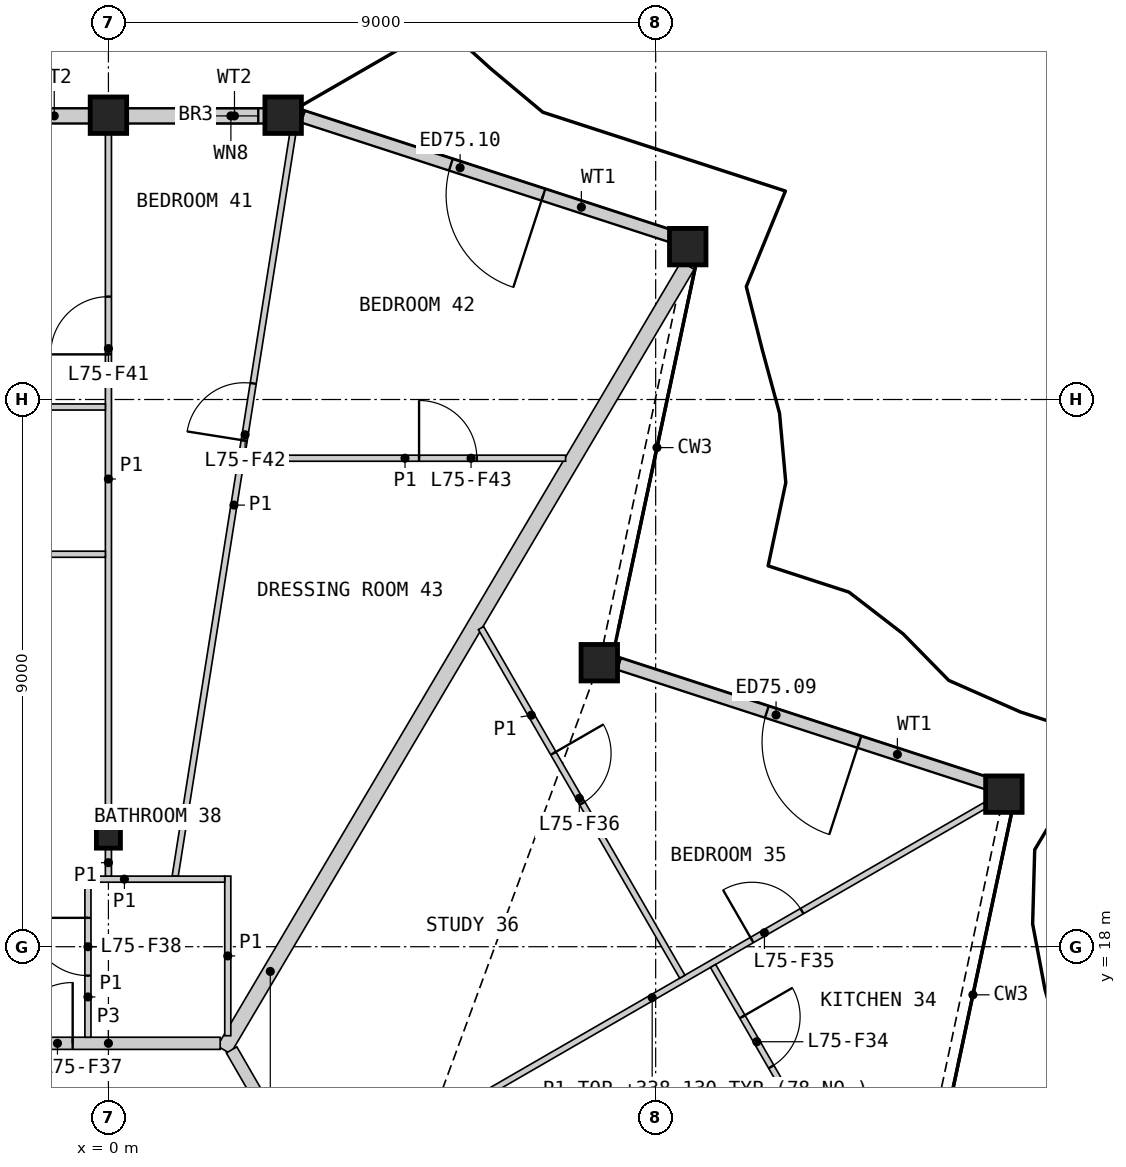
"""IFC4 building model, lengths in metres.
Left out: names, types, materials, properties, quantities, classifications, styles, units other than length and angle.
Written with IfcOpenShell. Run it as: python <this file> out.ifc"""

import sys

from ifc_helpers import new_model, si_unit, direction, frame, frame_2d, origin, origin_2d, place, context, subcontext, project, spatial, rectangle, hollow_rectangle, i_section, extrude, element, fill, save


model = new_model("IFC4")
c1 = context("Model", 3, precision=1e-05, world=origin(), true_north=direction((0.0, 1.0)))
c2 = subcontext(c1, "Body", "Model", "MODEL_VIEW")
j1 = project(units=[si_unit("LENGTHUNIT", "METRE"), si_unit("PLANEANGLEUNIT", "RADIAN")], contexts=[c1])
p1 = place(None, origin())
s1 = spatial("IfcSite", under=j1, at=p1, CompositionType="ELEMENT")
p2 = place(p1, origin())
s2 = spatial("IfcBuilding", under=s1, at=p2, CompositionType="ELEMENT")
p3 = place(p2, frame((0.0, 0.0, 335.8)))
s3 = spatial("IfcBuildingStorey", under=s2, at=p3, CompositionType="ELEMENT", Elevation=335.8)
for number, where, z_axis, x_axis in (
    (1, (14.727, 20.509, 0.0), (0.0, 0.0, 1.0), (1.0, 0.0, 0.0)),
    (2, (8.073, 22.671, 0.0), (0.0, 0.0, 1.0), (1.0, 0.0, 0.0)),
    (3, (9.527, 29.514, 0.0), (0.0, 0.0, 1.0), (1.0, 0.0, 0.0)),
    (4, (2.874, 31.676, 0.0), (0.0, 0.0, 1.0), (1.0, 0.0, 0.0)),
    (5, (0.0, 31.676, 0.0), (0.0, 0.0, 1.0), (1.0, 0.0, 0.0)),
):
    element("IfcColumn", number, at=place(p3, frame(where, z_axis=z_axis, x_axis=x_axis)), inside=s3, PredefinedType="COLUMN", context=c2, shape_type="SweptSolid", body=[
        extrude(hollow_rectangle(XDim=0.6, YDim=0.6, WallThickness=0.04, at=origin_2d()), origin(), (0.0, 0.0, 1.0), 3.4),
    ])
p4 = place(p3, frame((0.0, 19.811, 0.0), z_axis=(0.0, 0.0, 1.0), x_axis=(1.0, 0.0, 0.0)))
e6 = element("IfcColumn", 6, at=p4, inside=s3, PredefinedType="COLUMN", context=c2, shape_type="SweptSolid", body=[
    extrude(i_section(OverallWidth=0.396, OverallDepth=0.381, WebThickness=0.019, FlangeThickness=0.03, at=origin_2d()), origin(), (0.0, 0.0, 1.0), 3.4),
])
p5 = place(p3, frame((14.501, 20.667, 0.0), z_axis=(0.0, 0.0, 1.0), x_axis=(-0.951049165164, 0.309039617915, 0.0)))
e7 = element("IfcWall", 7, at=p5, inside=s3, PredefinedType="SOLIDWALL", context=c2, shape_type="SweptSolid", body=[
    extrude(rectangle(XDim=6.417, YDim=0.2, at=frame_2d((3.208, 0.0))), origin(), (0.0, 0.0, 1.0), 2.488),
])
p6 = place(p5, frame((2.262, 0.0, 0.0)))
e8 = element("IfcOpeningElement", 8, at=p6, cuts=e7, PredefinedType="OPENING", context=c2, shape_type="SweptSolid", body=[
    extrude(rectangle(XDim=1.6, YDim=2.25, at=frame_2d((0.8, 1.125))), frame((0.0, 0.11, 0.0), z_axis=(0.0, -1.0, 0.0), x_axis=(1.0, 0.0, 0.0)), (0.0, 0.0, 1.0), 0.22),
])
p7 = place(p3, frame((9.304, 29.668, 0.0), z_axis=(0.0, 0.0, 1.0), x_axis=(-0.951059216388, 0.309008684221, 0.0)))
e9 = element("IfcWall", 9, at=p7, inside=s3, PredefinedType="SOLIDWALL", context=c2, shape_type="SweptSolid", body=[
    extrude(rectangle(XDim=6.42, YDim=0.2, at=frame_2d((3.21, 0.0))), origin(), (0.0, 0.0, 1.0), 2.488),
])
p8 = place(p7, frame((2.262, 0.0, 0.0)))
e10 = element("IfcOpeningElement", 10, at=p8, cuts=e9, PredefinedType="OPENING", context=c2, shape_type="SweptSolid", body=[
    extrude(rectangle(XDim=1.6, YDim=2.25, at=frame_2d((0.8, 1.125))), frame((0.0, 0.11, 0.0), z_axis=(0.0, -1.0, 0.0), x_axis=(1.0, 0.0, 0.0)), (0.0, 0.0, 1.0), 0.22),
])
p9 = place(p3, frame((2.664, 31.664, 0.0), z_axis=(0.0, 0.0, 1.0), x_axis=(-1.0, 0.0, 0.0)))
e11 = element("IfcWall", 11, at=p9, inside=s3, PredefinedType="SOLIDWALL", context=c2, shape_type="SweptSolid", body=[
    extrude(rectangle(XDim=2.364, YDim=0.25, at=frame_2d((1.182, 0.0))), origin(), (0.0, 0.0, 1.0), 2.488),
])
p10 = place(p9, frame((0.2, 0.0, 1.5)))
e12 = element("IfcOpeningElement", 12, at=p10, cuts=e11, PredefinedType="OPENING", context=c2, shape_type="SweptSolid", body=[
    extrude(rectangle(XDim=0.9, YDim=0.7, at=frame_2d((0.45, 0.35))), frame((0.0, 0.135, 0.0), z_axis=(0.0, -1.0, 0.0), x_axis=(1.0, 0.0, 0.0)), (0.0, 0.0, 1.0), 0.27),
])
p11 = place(p3, frame((-0.3, 31.664, 0.0), z_axis=(0.0, 0.0, 1.0), x_axis=(-1.0, 0.0, 0.0)))
e13 = element("IfcWall", 13, at=p11, inside=s3, PredefinedType="SOLIDWALL", context=c2, shape_type="SweptSolid", body=[
    extrude(rectangle(XDim=2.364, YDim=0.25, at=frame_2d((1.182, 0.0))), origin(), (0.0, 0.0, 1.0), 2.488),
])
p12 = place(p3, frame((1.899, 16.303, 0.0), z_axis=(0.0, 0.0, 1.0), x_axis=(0.508895604687, 0.860828242758, 0.0)))
e14 = element("IfcWall", 14, at=p12, inside=s3, PredefinedType="PARTITIONING", context=c2, shape_type="SweptSolid", body=[
    extrude(rectangle(XDim=14.986, YDim=0.25, at=frame_2d((7.493, 0.0))), origin(), (0.0, 0.0, 1.0), 2.33),
])
p13 = place(p3, frame((2.025, 16.303, 0.0), z_axis=(0.0, 0.0, 1.0), x_axis=(0.499978750566, -0.866037671803, 0.0)))
e15 = element("IfcWall", 15, at=p13, inside=s3, PredefinedType="PARTITIONING", context=c2, shape_type="SweptSolid", body=[
    extrude(rectangle(XDim=4.288, YDim=0.2, at=frame_2d((2.144, 0.0))), origin(), (0.0, 0.0, 1.0), 3.1),
])
p14 = place(p3, frame((-1.838, 16.411, 0.0), z_axis=(0.0, 0.0, 1.0), x_axis=(1.0, 0.0, 0.0)))
e16 = element("IfcWall", 16, at=p14, inside=s3, PredefinedType="PARTITIONING", context=c2, shape_type="SweptSolid", body=[
    extrude(rectangle(XDim=3.676, YDim=0.2, at=frame_2d((1.838, 0.0))), origin(), (0.0, 0.0, 1.0), 3.1),
])
p15 = place(p14, frame((0.25, 0.0, 0.0)))
e17 = element("IfcOpeningElement", 17, at=p15, cuts=e16, PredefinedType="OPENING", context=c2, shape_type="SweptSolid", body=[
    extrude(rectangle(XDim=1.0, YDim=2.1, at=frame_2d((0.5, 1.05))), frame((0.0, 0.11, 0.0), z_axis=(0.0, -1.0, 0.0), x_axis=(1.0, 0.0, 0.0)), (0.0, 0.0, 1.0), 0.22),
])
p16 = place(p3, frame((3.469, 14.003, 0.0), z_axis=(0.0, 0.0, 1.0), x_axis=(0.866021563384, 0.50000665171, 0.0)))
e18 = element("IfcWall", 18, at=p16, inside=s3, PredefinedType="PARTITIONING", context=c2, shape_type="SweptSolid", body=[
    extrude(rectangle(XDim=12.641, YDim=0.1, at=frame_2d((6.321, 0.0))), origin(), (0.0, 0.0, 1.0), 2.33),
])
p17 = place(p16, frame((8.215, 0.0, 0.0)))
e19 = element("IfcOpeningElement", 19, at=p17, cuts=e18, PredefinedType="OPENING", context=c2, shape_type="SweptSolid", body=[
    extrude(rectangle(XDim=0.95, YDim=2.1, at=frame_2d((0.475, 1.05))), frame((0.0, 0.06, 0.0), z_axis=(0.0, -1.0, 0.0), x_axis=(1.0, 0.0, 0.0)), (0.0, 0.0, 1.0), 0.12),
])
p18 = place(p3, frame((1.098, 19.16, 0.0), z_axis=(0.0, 0.0, 1.0), x_axis=(0.156426176129, 0.987689653394, 0.0)))
e20 = element("IfcWall", 20, at=p18, inside=s3, PredefinedType="PARTITIONING", context=c2, shape_type="SweptSolid", body=[
    extrude(rectangle(XDim=12.358, YDim=0.1, at=frame_2d((6.179, 0.0))), origin(), (0.0, 0.0, 1.0), 2.33),
])
p19 = place(p18, frame((7.255, 0.0, 0.0)))
e21 = element("IfcOpeningElement", 21, at=p19, cuts=e20, PredefinedType="OPENING", context=c2, shape_type="SweptSolid", body=[
    extrude(rectangle(XDim=0.95, YDim=2.1, at=frame_2d((0.475, 1.05))), frame((0.0, 0.06, 0.0), z_axis=(0.0, -1.0, 0.0), x_axis=(1.0, 0.0, 0.0)), (0.0, 0.0, 1.0), 0.12),
])
p20 = place(p3, frame((0.0, 20.019, 0.0), z_axis=(0.0, 0.0, 1.0), x_axis=(0.0, 1.0, 0.0)))
e22 = element("IfcWall", 22, at=p20, inside=s3, PredefinedType="PARTITIONING", context=c2, shape_type="SweptSolid", body=[
    extrude(rectangle(XDim=11.347, YDim=0.1, at=frame_2d((5.674, 0.0))), origin(), (0.0, 0.0, 1.0), 2.33),
])
p21 = place(p20, frame((7.723, 0.0, 0.0)))
e23 = element("IfcOpeningElement", 23, at=p21, cuts=e22, PredefinedType="OPENING", context=c2, shape_type="SweptSolid", body=[
    extrude(rectangle(XDim=0.95, YDim=2.1, at=frame_2d((0.475, 1.05))), frame((0.0, 0.06, 0.0), z_axis=(0.0, -1.0, 0.0), x_axis=(1.0, 0.0, 0.0)), (0.0, 0.0, 1.0), 0.12),
])
p22 = place(p3, frame((-8.005, 26.877, 0.0), z_axis=(0.0, 0.0, 1.0), x_axis=(1.0, 0.0, 0.0)))
e24 = element("IfcWall", 24, at=p22, inside=s3, PredefinedType="PARTITIONING", context=c2, shape_type="SweptSolid", body=[
    extrude(rectangle(XDim=7.955, YDim=0.1, at=frame_2d((3.978, 0.0))), origin(), (0.0, 0.0, 1.0), 2.33),
])
p23 = place(p22, frame((3.853, 0.0, 0.0)))
e25 = element("IfcOpeningElement", 25, at=p23, cuts=e24, PredefinedType="OPENING", context=c2, shape_type="SweptSolid", body=[
    extrude(rectangle(XDim=0.95, YDim=2.1, at=frame_2d((0.475, 1.05))), frame((0.0, 0.06, 0.0), z_axis=(0.0, -1.0, 0.0), x_axis=(1.0, 0.0, 0.0)), (0.0, 0.0, 1.0), 0.12),
])
p24 = place(p3, frame((6.127, 23.241, 0.0), z_axis=(0.0, 0.0, 1.0), x_axis=(0.500021410345, -0.866013042163, 0.0)))
e26 = element("IfcWall", 26, at=p24, inside=s3, PredefinedType="PARTITIONING", context=c2, shape_type="SweptSolid", body=[
    extrude(rectangle(XDim=6.621, YDim=0.1, at=frame_2d((3.311, 0.0))), origin(), (0.0, 0.0, 1.0), 2.33),
])
p25 = place(p24, frame((2.379, 0.0, 0.0)))
e27 = element("IfcOpeningElement", 27, at=p25, cuts=e26, PredefinedType="OPENING", context=c2, shape_type="SweptSolid", body=[
    extrude(rectangle(XDim=0.95, YDim=2.1, at=frame_2d((0.475, 1.05))), frame((0.0, 0.06, 0.0), z_axis=(0.0, -1.0, 0.0), x_axis=(1.0, 0.0, 0.0)), (0.0, 0.0, 1.0), 0.12),
])
p26 = place(p3, frame((-6.607, 24.455, 0.0), z_axis=(0.0, 0.0, 1.0), x_axis=(1.0, 0.0, 0.0)))
e28 = element("IfcWall", 28, at=p26, inside=s3, PredefinedType="PARTITIONING", context=c2, shape_type="SweptSolid", body=[
    extrude(rectangle(XDim=6.557, YDim=0.1, at=frame_2d((3.279, 0.0))), origin(), (0.0, 0.0, 1.0), 2.33),
])
p27 = place(p26, frame((3.555, 0.0, 0.0)))
e29 = element("IfcOpeningElement", 29, at=p27, cuts=e28, PredefinedType="OPENING", context=c2, shape_type="SweptSolid", body=[
    extrude(rectangle(XDim=0.95, YDim=2.1, at=frame_2d((0.475, 1.05))), frame((0.0, 0.06, 0.0), z_axis=(0.0, -1.0, 0.0), x_axis=(1.0, 0.0, 0.0)), (0.0, 0.0, 1.0), 0.12),
])
p28 = place(p3, frame((2.237, 26.034, 0.0), z_axis=(0.0, 0.0, 1.0), x_axis=(1.0, 0.0, 0.0)))
e30 = element("IfcWall", 30, at=p28, inside=s3, PredefinedType="PARTITIONING", context=c2, shape_type="SweptSolid", body=[
    extrude(rectangle(XDim=5.282, YDim=0.1, at=frame_2d((2.641, 0.0))), origin(), (0.0, 0.0, 1.0), 2.33),
])
p29 = place(p28, frame((2.872, 0.0, 0.0)))
e31 = element("IfcOpeningElement", 31, at=p29, cuts=e30, PredefinedType="OPENING", context=c2, shape_type="SweptSolid", body=[
    extrude(rectangle(XDim=0.95, YDim=2.1, at=frame_2d((0.475, 1.05))), frame((0.0, 0.06, 0.0), z_axis=(0.0, -1.0, 0.0), x_axis=(1.0, 0.0, 0.0)), (0.0, 0.0, 1.0), 0.12),
])
p30 = place(p3, frame((9.944, 17.684, 0.0), z_axis=(0.0, 0.0, 1.0), x_axis=(0.499972176429, -0.866041467135, 0.0)))
e32 = element("IfcWall", 32, at=p30, inside=s3, PredefinedType="PARTITIONING", context=c2, shape_type="SweptSolid", body=[
    extrude(rectangle(XDim=5.021, YDim=0.1, at=frame_2d((2.511, 0.0))), origin(), (0.0, 0.0, 1.0), 2.33),
])
p31 = place(p30, frame((0.964, 0.0, 0.0)))
e33 = element("IfcOpeningElement", 33, at=p31, cuts=e32, PredefinedType="OPENING", context=c2, shape_type="SweptSolid", body=[
    extrude(rectangle(XDim=0.95, YDim=2.1, at=frame_2d((0.475, 1.05))), frame((0.0, 0.06, 0.0), z_axis=(0.0, -1.0, 0.0), x_axis=(1.0, 0.0, 0.0)), (0.0, 0.0, 1.0), 0.12),
])
p32 = place(p3, frame((-0.337, 16.511, 0.0), z_axis=(0.0, 0.0, 1.0), x_axis=(0.0, 1.0, 0.0)))
e34 = element("IfcWall", 34, at=p32, inside=s3, PredefinedType="PARTITIONING", context=c2, shape_type="SweptSolid", body=[
    extrude(rectangle(XDim=2.65, YDim=0.1, at=frame_2d((1.325, 0.0))), origin(), (0.0, 0.0, 1.0), 2.33),
])
p33 = place(p32, frame((1.014, 0.0, 0.0)))
e35 = element("IfcOpeningElement", 35, at=p33, cuts=e34, PredefinedType="OPENING", context=c2, shape_type="SweptSolid", body=[
    extrude(rectangle(XDim=0.95, YDim=2.1, at=frame_2d((0.475, 1.05))), frame((0.0, 0.06, 0.0), z_axis=(0.0, -1.0, 0.0), x_axis=(1.0, 0.0, 0.0)), (0.0, 0.0, 1.0), 0.12),
])
p34 = place(p3, frame((1.963, 16.536, 0.0), z_axis=(0.0, 0.0, 1.0), x_axis=(0.0, 1.0, 0.0)))
e36 = element("IfcWall", 36, at=p34, inside=s3, PredefinedType="PARTITIONING", context=c2, shape_type="SweptSolid", body=[
    extrude(rectangle(XDim=2.625, YDim=0.1, at=frame_2d((1.312, 0.0))), origin(), (0.0, 0.0, 1.0), 2.33),
])
p35 = place(p3, frame((-0.287, 19.111, 0.0), z_axis=(0.0, 0.0, 1.0), x_axis=(1.0, 0.0, 0.0)))
e37 = element("IfcWall", 37, at=p35, inside=s3, PredefinedType="PARTITIONING", context=c2, shape_type="SweptSolid", body=[
    extrude(rectangle(XDim=2.2, YDim=0.1, at=frame_2d((1.1, 0.0))), origin(), (0.0, 0.0, 1.0), 2.33),
])
p36 = place(p3, frame((0.0, 19.161, 0.0), z_axis=(0.0, 0.0, 1.0), x_axis=(0.0, 1.0, 0.0)))
e38 = element("IfcWall", 38, at=p36, inside=s3, PredefinedType="PARTITIONING", context=c2, shape_type="SweptSolid", body=[
    extrude(rectangle(XDim=0.442, YDim=0.1, at=frame_2d((0.221, 0.0))), origin(), (0.0, 0.0, 1.0), 2.33),
])
p37 = place(p6, origin())
e39 = element("IfcDoor", 39, at=p37, inside=s3, OperationType="DOUBLE_DOOR_SINGLE_SWING", PredefinedType="DOOR", context=c2, shape_type="SweptSolid", body=[
    extrude(rectangle(XDim=1.6, YDim=2.25, at=frame_2d((0.8, 1.125))), frame((0.0, 0.025, 0.0), z_axis=(0.0, -1.0, 0.0), x_axis=(1.0, 0.0, 0.0)), (0.0, 0.0, 1.0), 0.05),
])
fill(e8, e39)
p38 = place(p8, origin())
e40 = element("IfcDoor", 40, at=p38, inside=s3, OperationType="DOUBLE_DOOR_SINGLE_SWING", PredefinedType="DOOR", context=c2, shape_type="SweptSolid", body=[
    extrude(rectangle(XDim=1.6, YDim=2.25, at=frame_2d((0.8, 1.125))), frame((0.0, 0.025, 0.0), z_axis=(0.0, -1.0, 0.0), x_axis=(1.0, 0.0, 0.0)), (0.0, 0.0, 1.0), 0.05),
])
fill(e10, e40)
p39 = place(p10, origin())
e41 = element("IfcWindow", 41, at=p39, inside=s3, PartitioningType="SINGLE_PANEL", PredefinedType="WINDOW", context=c2, shape_type="SweptSolid", body=[
    extrude(rectangle(XDim=0.9, YDim=0.7, at=frame_2d((0.45, 0.35))), frame((0.0, 0.03, 0.0), z_axis=(0.0, -1.0, 0.0), x_axis=(1.0, 0.0, 0.0)), (0.0, 0.0, 1.0), 0.06),
])
fill(e12, e41)
p40 = place(p31, origin())
e42 = element("IfcDoor", 42, at=p40, inside=s3, OperationType="SINGLE_SWING_LEFT", PredefinedType="DOOR", context=c2, shape_type="SweptSolid", body=[
    extrude(rectangle(XDim=0.95, YDim=2.1, at=frame_2d((0.475, 1.05))), frame((0.0, 0.025, 0.0), z_axis=(0.0, -1.0, 0.0), x_axis=(1.0, 0.0, 0.0)), (0.0, 0.0, 1.0), 0.05),
])
fill(e33, e42)
p41 = place(p17, origin())
e43 = element("IfcDoor", 43, at=p41, inside=s3, OperationType="SINGLE_SWING_LEFT", PredefinedType="DOOR", context=c2, shape_type="SweptSolid", body=[
    extrude(rectangle(XDim=0.95, YDim=2.1, at=frame_2d((0.475, 1.05))), frame((0.0, 0.025, 0.0), z_axis=(0.0, -1.0, 0.0), x_axis=(1.0, 0.0, 0.0)), (0.0, 0.0, 1.0), 0.05),
])
fill(e19, e43)
p42 = place(p25, origin())
e44 = element("IfcDoor", 44, at=p42, inside=s3, OperationType="SINGLE_SWING_LEFT", PredefinedType="DOOR", context=c2, shape_type="SweptSolid", body=[
    extrude(rectangle(XDim=0.95, YDim=2.1, at=frame_2d((0.475, 1.05))), frame((0.0, 0.025, 0.0), z_axis=(0.0, -1.0, 0.0), x_axis=(1.0, 0.0, 0.0)), (0.0, 0.0, 1.0), 0.05),
])
fill(e27, e44)
p43 = place(p15, origin())
e45 = element("IfcDoor", 45, at=p43, inside=s3, OperationType="SINGLE_SWING_RIGHT", PredefinedType="DOOR", context=c2, shape_type="SweptSolid", body=[
    extrude(rectangle(XDim=1.0, YDim=2.1, at=frame_2d((0.5, 1.05))), frame((0.0, 0.025, 0.0), z_axis=(0.0, -1.0, 0.0), x_axis=(1.0, 0.0, 0.0)), (0.0, 0.0, 1.0), 0.05),
])
fill(e17, e45)
p44 = place(p33, origin())
e46 = element("IfcDoor", 46, at=p44, inside=s3, OperationType="SINGLE_SWING_RIGHT", PredefinedType="DOOR", context=c2, shape_type="SweptSolid", body=[
    extrude(rectangle(XDim=0.95, YDim=2.1, at=frame_2d((0.475, 1.05))), frame((0.0, 0.025, 0.0), z_axis=(0.0, -1.0, 0.0), x_axis=(1.0, 0.0, 0.0)), (0.0, 0.0, 1.0), 0.05),
])
fill(e35, e46)
p45 = place(p21, origin())
e47 = element("IfcDoor", 47, at=p45, inside=s3, OperationType="SINGLE_SWING_LEFT", PredefinedType="DOOR", context=c2, shape_type="SweptSolid", body=[
    extrude(rectangle(XDim=0.95, YDim=2.1, at=frame_2d((0.475, 1.05))), frame((0.0, 0.025, 0.0), z_axis=(0.0, -1.0, 0.0), x_axis=(1.0, 0.0, 0.0)), (0.0, 0.0, 1.0), 0.05),
])
fill(e23, e47)
p46 = place(p19, origin())
e48 = element("IfcDoor", 48, at=p46, inside=s3, OperationType="SINGLE_SWING_LEFT", PredefinedType="DOOR", context=c2, shape_type="SweptSolid", body=[
    extrude(rectangle(XDim=0.95, YDim=2.1, at=frame_2d((0.475, 1.05))), frame((0.0, 0.025, 0.0), z_axis=(0.0, -1.0, 0.0), x_axis=(1.0, 0.0, 0.0)), (0.0, 0.0, 1.0), 0.05),
])
fill(e21, e48)
p47 = place(p29, origin())
e49 = element("IfcDoor", 49, at=p47, inside=s3, OperationType="SINGLE_SWING_LEFT", PredefinedType="DOOR", context=c2, shape_type="SweptSolid", body=[
    extrude(rectangle(XDim=0.95, YDim=2.1, at=frame_2d((0.475, 1.05))), frame((0.0, 0.025, 0.0), z_axis=(0.0, -1.0, 0.0), x_axis=(1.0, 0.0, 0.0)), (0.0, 0.0, 1.0), 0.05),
])
fill(e31, e49)
save(model, sys.argv[1])
